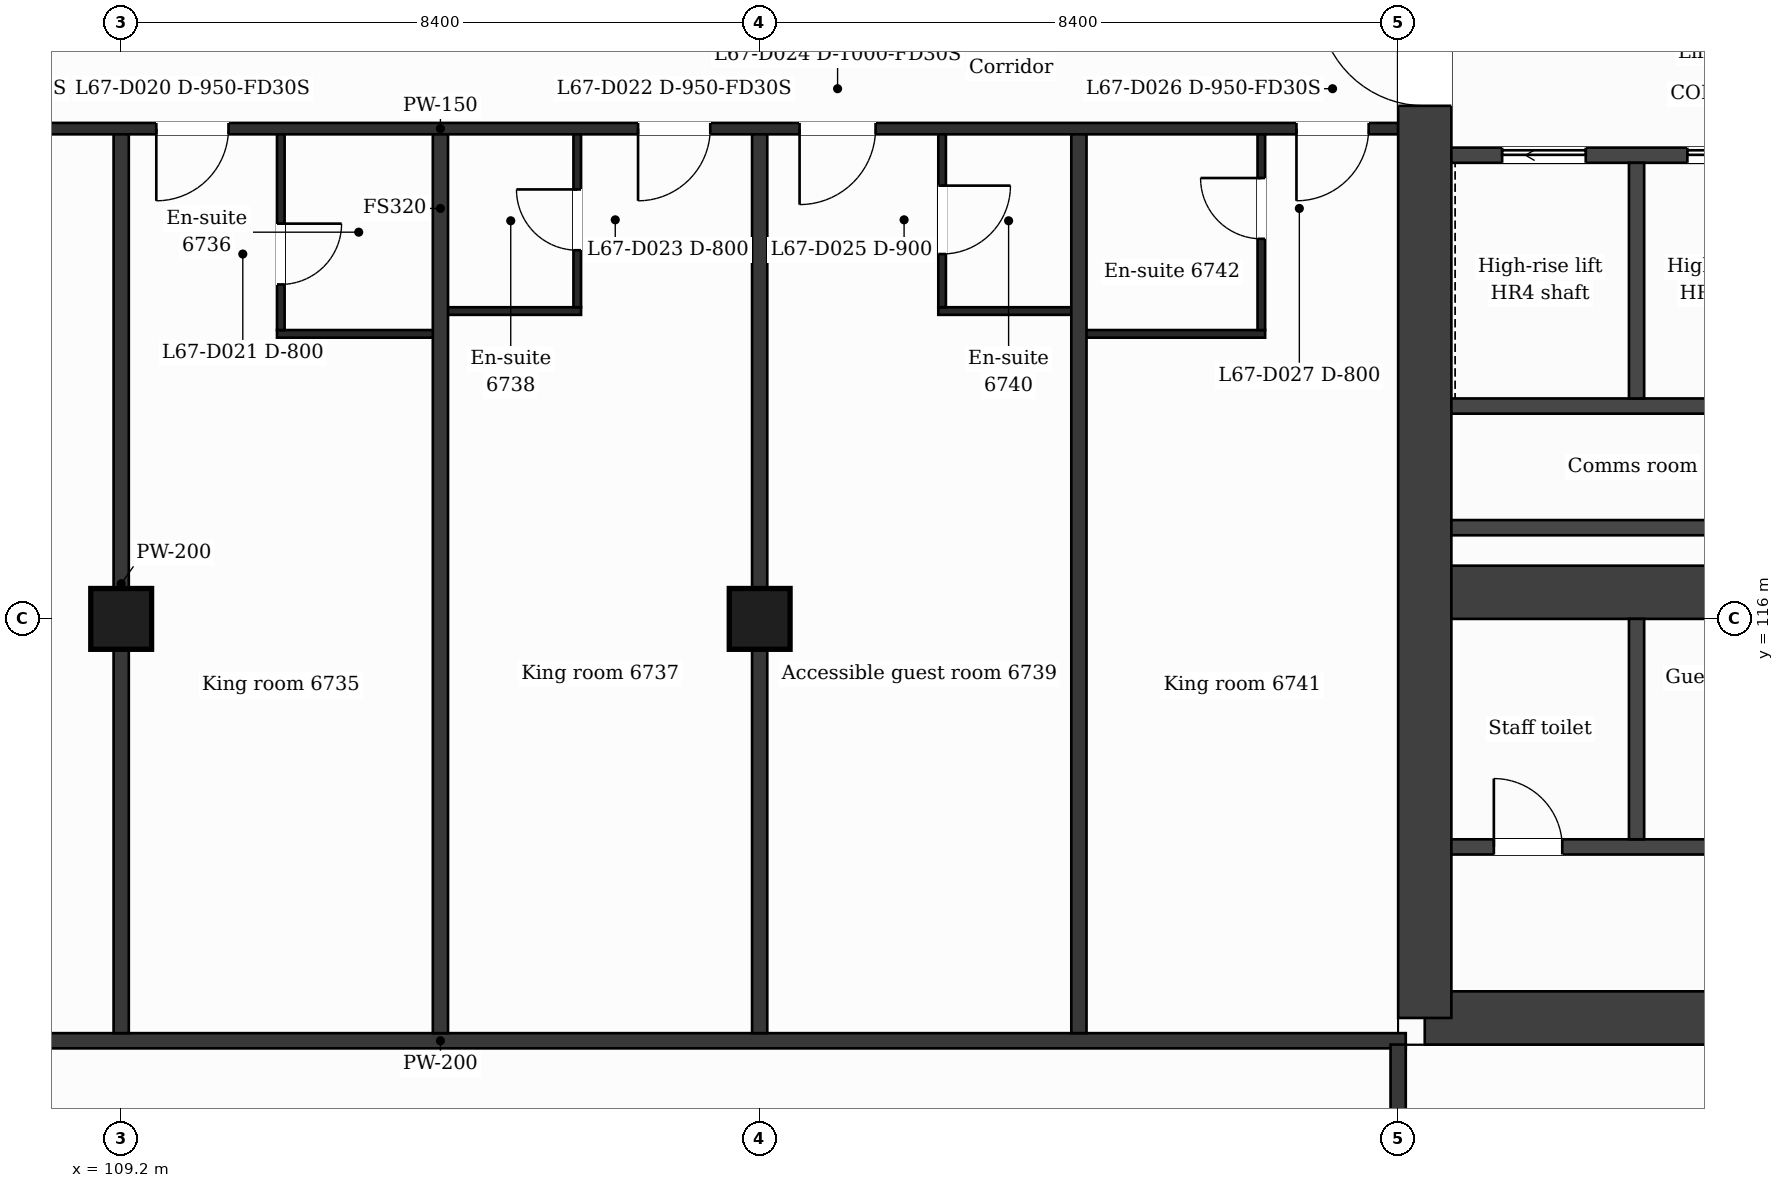
"""IFC4 building model, lengths in metres.
Left out: names, types, materials, properties, quantities, classifications, styles, units other than length and angle.
Written with IfcOpenShell. Run it as: python <this file> out.ifc"""

import sys

from ifc_helpers import new_model, si_unit, direction, frame, frame_2d, origin, origin_2d, place, context, subcontext, project, spatial, rectangle, extrude, element, fill, save


model = new_model("IFC4")
c1 = context("Model", 3, precision=1e-05, world=origin(), true_north=direction((0.0, 1.0)))
c2 = subcontext(c1, "Body", "Model", "MODEL_VIEW")
j1 = project(units=[si_unit("LENGTHUNIT", "METRE"), si_unit("PLANEANGLEUNIT", "RADIAN")], contexts=[c1])
p1 = place(None, origin())
s1 = spatial("IfcSite", under=j1, at=p1, CompositionType="ELEMENT")
p2 = place(p1, origin())
s2 = spatial("IfcBuilding", under=s1, at=p2, CompositionType="ELEMENT")
p3 = place(p2, frame((0.0, 0.0, 277.5)))
s3 = spatial("IfcBuildingStorey", under=s2, at=p3, CompositionType="ELEMENT", Elevation=277.5)
p4 = place(p3, frame((140.73, 110.75, 0.0), z_axis=(0.0, 0.0, 1.0), x_axis=(-1.0, 0.0, 0.0)))
e1 = element("IfcWall", 1, at=p4, inside=s3, PredefinedType="SHEAR", context=c2, shape_type="SweptSolid", body=[
    extrude(rectangle(XDim=14.38, YDim=0.7, at=frame_2d((7.19, 0.0))), origin(), (0.0, 0.0, 1.0), 3.7),
])
p5 = place(p4, frame((7.12, 0.0, 0.0)))
e2 = element("IfcOpeningElement", 2, at=p5, cuts=e1, PredefinedType="OPENING", context=c2, shape_type="SweptSolid", body=[
    extrude(rectangle(XDim=1.2, YDim=2.1, at=frame_2d((0.6, 1.05))), frame((0.0, 0.36, 0.0), z_axis=(0.0, -1.0, 0.0), x_axis=(1.0, 0.0, 0.0)), (0.0, 0.0, 1.0), 0.72),
])
p6 = place(p3, frame((126.35, 110.75, 0.0), z_axis=(0.0, 0.0, 1.0), x_axis=(0.0, 1.0, 0.0)))
e3 = element("IfcWall", 3, at=p6, inside=s3, PredefinedType="SHEAR", context=c2, shape_type="SweptSolid", body=[
    extrude(rectangle(XDim=21.3, YDim=0.7, at=frame_2d((10.65, 0.0))), origin(), (0.0, 0.0, 1.0), 3.7),
])
p7 = place(p6, frame((12.0, 0.0, 0.0)))
e4 = element("IfcOpeningElement", 4, at=p7, cuts=e3, PredefinedType="OPENING", context=c2, shape_type="SweptSolid", body=[
    extrude(rectangle(XDim=1.4, YDim=2.1, at=frame_2d((0.7, 1.05))), frame((0.0, 0.36, 0.0), z_axis=(0.0, -1.0, 0.0), x_axis=(1.0, 0.0, 0.0)), (0.0, 0.0, 1.0), 0.72),
])
p8 = place(p3, frame((126.7, 116.35, 0.0), z_axis=(0.0, 0.0, 1.0), x_axis=(1.0, 0.0, 0.0)))
e5 = element("IfcWall", 5, at=p8, inside=s3, PredefinedType="SHEAR", context=c2, shape_type="SweptSolid", body=[
    extrude(rectangle(XDim=5.5, YDim=0.7, at=frame_2d((2.75, 0.0))), origin(), (0.0, 0.0, 1.0), 3.7),
])
for number, where, z_axis, x_axis in (
    (6, (109.2, 116.0, 0.0), (0.0, 0.0, 1.0), (1.0, 0.0, 0.0)),
    (7, (117.6, 116.0, 0.0), (0.0, 0.0, 1.0), (1.0, 0.0, 0.0)),
):
    element("IfcColumn", number, at=place(p3, frame(where, z_axis=z_axis, x_axis=x_axis)), inside=s3, PredefinedType="COLUMN", context=c2, shape_type="SweptSolid", body=[
        extrude(rectangle(XDim=0.8, YDim=0.8, at=origin_2d()), origin(), (0.0, 0.0, 1.0), 3.7),
    ])
p9 = place(p3, frame((100.7, 110.45, 0.0), z_axis=(0.0, 0.0, 1.0), x_axis=(1.0, 0.0, 0.0)))
e8 = element("IfcWall", 8, at=p9, inside=s3, PredefinedType="PARTITIONING", context=c2, shape_type="SweptSolid", body=[
    extrude(rectangle(XDim=25.4, YDim=0.2, at=frame_2d((12.7, 0.0))), origin(), (0.0, 0.0, 1.0), 3.38),
])
p10 = place(p3, frame((126.7, 113.0, 0.0), z_axis=(0.0, 0.0, 1.0), x_axis=(1.0, 0.0, 0.0)))
e9 = element("IfcWall", 9, at=p10, inside=s3, PredefinedType="PARTITIONING", context=c2, shape_type="SweptSolid", body=[
    extrude(rectangle(XDim=4.973, YDim=0.2, at=frame_2d((2.487, 0.0))), origin(), (0.0, 0.0, 1.0), 3.38),
])
p11 = place(p10, frame((0.559, 0.0, 0.0)))
e10 = element("IfcOpeningElement", 10, at=p11, cuts=e9, PredefinedType="OPENING", context=c2, shape_type="SweptSolid", body=[
    extrude(rectangle(XDim=0.9, YDim=2.1, at=frame_2d((0.45, 1.05))), frame((0.0, 0.11, 0.0), z_axis=(0.0, -1.0, 0.0), x_axis=(1.0, 0.0, 0.0)), (0.0, 0.0, 1.0), 0.22),
])
for number, where, z_axis, x_axis in (
    (11, (126.7, 117.2, 0.0), (0.0, 0.0, 1.0), (1.0, 0.0, 0.0)),
    (12, (126.7, 118.8, 0.0), (0.0, 0.0, 1.0), (1.0, 0.0, 0.0)),
):
    element("IfcWall", number, at=place(p3, frame(where, z_axis=z_axis, x_axis=x_axis)), inside=s3, PredefinedType="PARTITIONING", context=c2, shape_type="SweptSolid", body=[
        extrude(rectangle(XDim=4.873, YDim=0.2, at=frame_2d((2.437, 0.0))), origin(), (0.0, 0.0, 1.0), 3.38),
    ])
p12 = place(p3, frame((111.25, 119.75, 0.0), z_axis=(0.0, 0.0, 1.0), x_axis=(1.0, 0.0, 0.0)))
e13 = element("IfcWall", 13, at=p12, inside=s3, PredefinedType="PARTITIONING", context=c2, shape_type="SweptSolid", body=[
    extrude(rectangle(XDim=2.15, YDim=0.1, at=frame_2d((1.075, 0.0))), origin(), (0.0, 0.0, 1.0), 3.38),
])
p13 = place(p3, frame((121.8, 119.75, 0.0), z_axis=(0.0, 0.0, 1.0), x_axis=(1.0, 0.0, 0.0)))
e14 = element("IfcWall", 14, at=p13, inside=s3, PredefinedType="PARTITIONING", context=c2, shape_type="SweptSolid", body=[
    extrude(rectangle(XDim=2.45, YDim=0.1, at=frame_2d((1.225, 0.0))), origin(), (0.0, 0.0, 1.0), 3.38),
])
for number, where, z_axis, x_axis in (
    (15, (113.4, 120.05, 0.0), (0.0, 0.0, 1.0), (1.0, 0.0, 0.0)),
    (16, (119.95, 120.05, 0.0), (0.0, 0.0, 1.0), (1.0, 0.0, 0.0)),
):
    element("IfcWall", number, at=place(p3, frame(where, z_axis=z_axis, x_axis=x_axis)), inside=s3, PredefinedType="PARTITIONING", context=c2, shape_type="SweptSolid", body=[
        extrude(rectangle(XDim=1.85, YDim=0.1, at=frame_2d((0.925, 0.0))), origin(), (0.0, 0.0, 1.0), 3.38),
    ])
p14 = place(p3, frame((126.7, 122.1, 0.0), z_axis=(0.0, 0.0, 1.0), x_axis=(1.0, 0.0, 0.0)))
e17 = element("IfcWall", 17, at=p14, inside=s3, PredefinedType="PARTITIONING", context=c2, shape_type="SweptSolid", body=[
    extrude(rectangle(XDim=4.873, YDim=0.2, at=frame_2d((2.437, 0.0))), origin(), (0.0, 0.0, 1.0), 3.38),
])
p15 = place(p14, frame((3.105, 0.0, 0.0)))
e18 = element("IfcOpeningElement", 18, at=p15, cuts=e17, PredefinedType="OPENING", context=c2, shape_type="SweptSolid", body=[
    extrude(rectangle(XDim=1.1, YDim=2.1, at=frame_2d((0.55, 1.05))), frame((0.0, 0.11, 0.0), z_axis=(0.0, -1.0, 0.0), x_axis=(1.0, 0.0, 0.0)), (0.0, 0.0, 1.0), 0.22),
])
p16 = place(p14, frame((0.668, 0.0, 0.0)))
e19 = element("IfcOpeningElement", 19, at=p16, cuts=e17, PredefinedType="OPENING", context=c2, shape_type="SweptSolid", body=[
    extrude(rectangle(XDim=1.1, YDim=2.1, at=frame_2d((0.55, 1.05))), frame((0.0, 0.11, 0.0), z_axis=(0.0, -1.0, 0.0), x_axis=(1.0, 0.0, 0.0)), (0.0, 0.0, 1.0), 0.22),
])
p17 = place(p3, frame((100.8, 122.45, 0.0), z_axis=(0.0, 0.0, 1.0), x_axis=(1.0, 0.0, 0.0)))
e20 = element("IfcWall", 20, at=p17, inside=s3, PredefinedType="PARTITIONING", context=c2, shape_type="SweptSolid", body=[
    extrude(rectangle(XDim=25.2, YDim=0.15, at=frame_2d((12.6, 0.0))), origin(), (0.0, 0.0, 1.0), 3.38),
])
p18 = place(p17, frame((5.55, 0.0, 0.0)))
e21 = element("IfcOpeningElement", 21, at=p18, cuts=e20, PredefinedType="OPENING", context=c2, shape_type="SweptSolid", body=[
    extrude(rectangle(XDim=1.0, YDim=2.1, at=frame_2d((0.5, 1.05))), frame((0.0, 0.085, 0.0), z_axis=(0.0, -1.0, 0.0), x_axis=(1.0, 0.0, 0.0)), (0.0, 0.0, 1.0), 0.17),
])
p19 = place(p17, frame((8.862, 0.0, 0.0)))
e22 = element("IfcOpeningElement", 22, at=p19, cuts=e20, PredefinedType="OPENING", context=c2, shape_type="SweptSolid", body=[
    extrude(rectangle(XDim=0.95, YDim=2.1, at=frame_2d((0.475, 1.05))), frame((0.0, 0.085, 0.0), z_axis=(0.0, -1.0, 0.0), x_axis=(1.0, 0.0, 0.0)), (0.0, 0.0, 1.0), 0.17),
])
p20 = place(p17, frame((15.2, 0.0, 0.0)))
e23 = element("IfcOpeningElement", 23, at=p20, cuts=e20, PredefinedType="OPENING", context=c2, shape_type="SweptSolid", body=[
    extrude(rectangle(XDim=0.95, YDim=2.1, at=frame_2d((0.475, 1.05))), frame((0.0, 0.085, 0.0), z_axis=(0.0, -1.0, 0.0), x_axis=(1.0, 0.0, 0.0)), (0.0, 0.0, 1.0), 0.17),
])
p21 = place(p17, frame((17.325, 0.0, 0.0)))
e24 = element("IfcOpeningElement", 24, at=p21, cuts=e20, PredefinedType="OPENING", context=c2, shape_type="SweptSolid", body=[
    extrude(rectangle(XDim=1.0, YDim=2.1, at=frame_2d((0.5, 1.05))), frame((0.0, 0.085, 0.0), z_axis=(0.0, -1.0, 0.0), x_axis=(1.0, 0.0, 0.0)), (0.0, 0.0, 1.0), 0.17),
])
p22 = place(p17, frame((23.862, 0.0, 0.0)))
e25 = element("IfcOpeningElement", 25, at=p22, cuts=e20, PredefinedType="OPENING", context=c2, shape_type="SweptSolid", body=[
    extrude(rectangle(XDim=0.95, YDim=2.1, at=frame_2d((0.475, 1.05))), frame((0.0, 0.085, 0.0), z_axis=(0.0, -1.0, 0.0), x_axis=(1.0, 0.0, 0.0)), (0.0, 0.0, 1.0), 0.17),
])
p23 = place(p3, frame((109.2, 110.55, 0.0), z_axis=(0.0, 0.0, 1.0), x_axis=(0.0, 1.0, 0.0)))
e26 = element("IfcWall", 26, at=p23, inside=s3, PredefinedType="PARTITIONING", context=c2, shape_type="SweptSolid", body=[
    extrude(rectangle(XDim=11.825, YDim=0.2, at=frame_2d((5.913, 0.0))), origin(), (0.0, 0.0, 1.0), 3.38),
])
p24 = place(p3, frame((111.3, 119.8, 0.0), z_axis=(0.0, 0.0, 1.0), x_axis=(0.0, 1.0, 0.0)))
e27 = element("IfcWall", 27, at=p24, inside=s3, PredefinedType="PARTITIONING", context=c2, shape_type="SweptSolid", body=[
    extrude(rectangle(XDim=2.575, YDim=0.1, at=frame_2d((1.288, 0.0))), origin(), (0.0, 0.0, 1.0), 3.38),
])
p25 = place(p24, frame((0.6, 0.0, 0.0)))
e28 = element("IfcOpeningElement", 28, at=p25, cuts=e27, PredefinedType="OPENING", context=c2, shape_type="SweptSolid", body=[
    extrude(rectangle(XDim=0.8, YDim=2.1, at=frame_2d((0.4, 1.05))), frame((0.0, 0.06, 0.0), z_axis=(0.0, -1.0, 0.0), x_axis=(1.0, 0.0, 0.0)), (0.0, 0.0, 1.0), 0.12),
])
p26 = place(p3, frame((113.4, 110.55, 0.0), z_axis=(0.0, 0.0, 1.0), x_axis=(0.0, 1.0, 0.0)))
e29 = element("IfcWall", 29, at=p26, inside=s3, PredefinedType="PARTITIONING", context=c2, shape_type="SweptSolid", body=[
    extrude(rectangle(XDim=11.825, YDim=0.2, at=frame_2d((5.913, 0.0))), origin(), (0.0, 0.0, 1.0), 3.38),
])
p27 = place(p3, frame((115.2, 120.1, 0.0), z_axis=(0.0, 0.0, 1.0), x_axis=(0.0, 1.0, 0.0)))
e30 = element("IfcWall", 30, at=p27, inside=s3, PredefinedType="PARTITIONING", context=c2, shape_type="SweptSolid", body=[
    extrude(rectangle(XDim=2.275, YDim=0.1, at=frame_2d((1.137, 0.0))), origin(), (0.0, 0.0, 1.0), 3.38),
])
p28 = place(p27, frame((0.75, 0.0, 0.0)))
e31 = element("IfcOpeningElement", 31, at=p28, cuts=e30, PredefinedType="OPENING", context=c2, shape_type="SweptSolid", body=[
    extrude(rectangle(XDim=0.8, YDim=2.1, at=frame_2d((0.4, 1.05))), frame((0.0, 0.06, 0.0), z_axis=(0.0, -1.0, 0.0), x_axis=(1.0, 0.0, 0.0)), (0.0, 0.0, 1.0), 0.12),
])
p29 = place(p3, frame((117.6, 110.55, 0.0), z_axis=(0.0, 0.0, 1.0), x_axis=(0.0, 1.0, 0.0)))
e32 = element("IfcWall", 32, at=p29, inside=s3, PredefinedType="PARTITIONING", context=c2, shape_type="SweptSolid", body=[
    extrude(rectangle(XDim=11.825, YDim=0.2, at=frame_2d((5.913, 0.0))), origin(), (0.0, 0.0, 1.0), 3.38),
])
p30 = place(p3, frame((120.0, 120.1, 0.0), z_axis=(0.0, 0.0, 1.0), x_axis=(0.0, 1.0, 0.0)))
e33 = element("IfcWall", 33, at=p30, inside=s3, PredefinedType="PARTITIONING", context=c2, shape_type="SweptSolid", body=[
    extrude(rectangle(XDim=2.275, YDim=0.1, at=frame_2d((1.137, 0.0))), origin(), (0.0, 0.0, 1.0), 3.38),
])
p31 = place(p30, frame((0.7, 0.0, 0.0)))
e34 = element("IfcOpeningElement", 34, at=p31, cuts=e33, PredefinedType="OPENING", context=c2, shape_type="SweptSolid", body=[
    extrude(rectangle(XDim=0.9, YDim=2.1, at=frame_2d((0.45, 1.05))), frame((0.0, 0.06, 0.0), z_axis=(0.0, -1.0, 0.0), x_axis=(1.0, 0.0, 0.0)), (0.0, 0.0, 1.0), 0.12),
])
p32 = place(p3, frame((121.8, 110.55, 0.0), z_axis=(0.0, 0.0, 1.0), x_axis=(0.0, 1.0, 0.0)))
e35 = element("IfcWall", 35, at=p32, inside=s3, PredefinedType="PARTITIONING", context=c2, shape_type="SweptSolid", body=[
    extrude(rectangle(XDim=11.825, YDim=0.2, at=frame_2d((5.913, 0.0))), origin(), (0.0, 0.0, 1.0), 3.38),
])
p33 = place(p3, frame((124.2, 119.8, 0.0), z_axis=(0.0, 0.0, 1.0), x_axis=(0.0, 1.0, 0.0)))
e36 = element("IfcWall", 36, at=p33, inside=s3, PredefinedType="PARTITIONING", context=c2, shape_type="SweptSolid", body=[
    extrude(rectangle(XDim=2.575, YDim=0.1, at=frame_2d((1.288, 0.0))), origin(), (0.0, 0.0, 1.0), 3.38),
])
p34 = place(p33, frame((1.2, 0.0, 0.0)))
e37 = element("IfcOpeningElement", 37, at=p34, cuts=e36, PredefinedType="OPENING", context=c2, shape_type="SweptSolid", body=[
    extrude(rectangle(XDim=0.8, YDim=2.1, at=frame_2d((0.4, 1.05))), frame((0.0, 0.06, 0.0), z_axis=(0.0, -1.0, 0.0), x_axis=(1.0, 0.0, 0.0)), (0.0, 0.0, 1.0), 0.12),
])
p35 = place(p3, frame((126.0, 108.79, 0.0), z_axis=(0.0, 0.0, 1.0), x_axis=(0.0, 1.0, 0.0)))
e38 = element("IfcWall", 38, at=p35, inside=s3, PredefinedType="PARTITIONING", context=c2, shape_type="SweptSolid", body=[
    extrude(rectangle(XDim=1.61, YDim=0.2, at=frame_2d((0.805, 0.0))), origin(), (0.0, 0.0, 1.0), 3.38),
])
p36 = place(p3, frame((129.136, 113.1, 0.0), z_axis=(0.0, 0.0, 1.0), x_axis=(0.0, 1.0, 0.0)))
e39 = element("IfcWall", 39, at=p36, inside=s3, PredefinedType="PARTITIONING", context=c2, shape_type="SweptSolid", body=[
    extrude(rectangle(XDim=2.9, YDim=0.2, at=frame_2d((1.45, 0.0))), origin(), (0.0, 0.0, 1.0), 3.38),
])
p37 = place(p3, frame((129.136, 118.9, 0.0), z_axis=(0.0, 0.0, 1.0), x_axis=(0.0, 1.0, 0.0)))
e40 = element("IfcWall", 40, at=p37, inside=s3, PredefinedType="PARTITIONING", context=c2, shape_type="SweptSolid", body=[
    extrude(rectangle(XDim=3.1, YDim=0.2, at=frame_2d((1.55, 0.0))), origin(), (0.0, 0.0, 1.0), 3.38),
])
p38 = place(p15, origin())
e41 = element("IfcDoor", 41, at=p38, inside=s3, OperationType="SLIDING_TO_LEFT", PredefinedType="DOOR", context=c2, shape_type="SweptSolid", body=[
    extrude(rectangle(XDim=1.1, YDim=2.1, at=frame_2d((0.55, 1.05))), frame((0.0, 0.025, 0.0), z_axis=(0.0, -1.0, 0.0), x_axis=(1.0, 0.0, 0.0)), (0.0, 0.0, 1.0), 0.05),
])
fill(e18, e41)
p39 = place(p16, origin())
e42 = element("IfcDoor", 42, at=p39, inside=s3, OperationType="SLIDING_TO_LEFT", PredefinedType="DOOR", context=c2, shape_type="SweptSolid", body=[
    extrude(rectangle(XDim=1.1, YDim=2.1, at=frame_2d((0.55, 1.05))), frame((0.0, 0.025, 0.0), z_axis=(0.0, -1.0, 0.0), x_axis=(1.0, 0.0, 0.0)), (0.0, 0.0, 1.0), 0.05),
])
fill(e19, e42)
p40 = place(p11, origin())
e43 = element("IfcDoor", 43, at=p40, inside=s3, OperationType="SINGLE_SWING_LEFT", PredefinedType="DOOR", context=c2, shape_type="SweptSolid", body=[
    extrude(rectangle(XDim=0.9, YDim=2.1, at=frame_2d((0.45, 1.05))), frame((0.0, 0.025, 0.0), z_axis=(0.0, -1.0, 0.0), x_axis=(1.0, 0.0, 0.0)), (0.0, 0.0, 1.0), 0.05),
])
fill(e10, e43)
p41 = place(p19, origin())
e44 = element("IfcDoor", 44, at=p41, inside=s3, OperationType="SINGLE_SWING_LEFT", PredefinedType="DOOR", context=c2, shape_type="SweptSolid", body=[
    extrude(rectangle(XDim=0.95, YDim=2.1, at=frame_2d((0.475, 1.05))), frame((0.0, 0.025, 0.0), z_axis=(0.0, -1.0, 0.0), x_axis=(1.0, 0.0, 0.0)), (0.0, 0.0, 1.0), 0.05),
])
fill(e22, e44)
p42 = place(p25, origin())
e45 = element("IfcDoor", 45, at=p42, inside=s3, OperationType="SINGLE_SWING_RIGHT", PredefinedType="DOOR", context=c2, shape_type="SweptSolid", body=[
    extrude(rectangle(XDim=0.8, YDim=2.1, at=frame_2d((0.4, 1.05))), frame((0.0, 0.025, 0.0), z_axis=(0.0, -1.0, 0.0), x_axis=(1.0, 0.0, 0.0)), (0.0, 0.0, 1.0), 0.05),
])
fill(e28, e45)
p43 = place(p20, origin())
e46 = element("IfcDoor", 46, at=p43, inside=s3, OperationType="SINGLE_SWING_LEFT", PredefinedType="DOOR", context=c2, shape_type="SweptSolid", body=[
    extrude(rectangle(XDim=0.95, YDim=2.1, at=frame_2d((0.475, 1.05))), frame((0.0, 0.025, 0.0), z_axis=(0.0, -1.0, 0.0), x_axis=(1.0, 0.0, 0.0)), (0.0, 0.0, 1.0), 0.05),
])
fill(e23, e46)
p44 = place(p28, origin())
e47 = element("IfcDoor", 47, at=p44, inside=s3, OperationType="SINGLE_SWING_RIGHT", PredefinedType="DOOR", context=c2, shape_type="SweptSolid", body=[
    extrude(rectangle(XDim=0.8, YDim=2.1, at=frame_2d((0.4, 1.05))), frame((0.0, 0.025, 0.0), z_axis=(0.0, -1.0, 0.0), x_axis=(1.0, 0.0, 0.0)), (0.0, 0.0, 1.0), 0.05),
])
fill(e31, e47)
p45 = place(p21, origin())
e48 = element("IfcDoor", 48, at=p45, inside=s3, OperationType="SINGLE_SWING_LEFT", PredefinedType="DOOR", context=c2, shape_type="SweptSolid", body=[
    extrude(rectangle(XDim=1.0, YDim=2.1, at=frame_2d((0.5, 1.05))), frame((0.0, 0.025, 0.0), z_axis=(0.0, -1.0, 0.0), x_axis=(1.0, 0.0, 0.0)), (0.0, 0.0, 1.0), 0.05),
])
fill(e24, e48)
p46 = place(p31, origin())
e49 = element("IfcDoor", 49, at=p46, inside=s3, OperationType="SINGLE_SWING_RIGHT", PredefinedType="DOOR", context=c2, shape_type="SweptSolid", body=[
    extrude(rectangle(XDim=0.9, YDim=2.1, at=frame_2d((0.45, 1.05))), frame((0.0, 0.025, 0.0), z_axis=(0.0, -1.0, 0.0), x_axis=(1.0, 0.0, 0.0)), (0.0, 0.0, 1.0), 0.05),
])
fill(e34, e49)
p47 = place(p22, origin())
e50 = element("IfcDoor", 50, at=p47, inside=s3, OperationType="SINGLE_SWING_LEFT", PredefinedType="DOOR", context=c2, shape_type="SweptSolid", body=[
    extrude(rectangle(XDim=0.95, YDim=2.1, at=frame_2d((0.475, 1.05))), frame((0.0, 0.025, 0.0), z_axis=(0.0, -1.0, 0.0), x_axis=(1.0, 0.0, 0.0)), (0.0, 0.0, 1.0), 0.05),
])
fill(e25, e50)
p48 = place(p34, origin())
e51 = element("IfcDoor", 51, at=p48, inside=s3, OperationType="SINGLE_SWING_RIGHT", PredefinedType="DOOR", context=c2, shape_type="SweptSolid", body=[
    extrude(rectangle(XDim=0.8, YDim=2.1, at=frame_2d((0.4, 1.05))), frame((0.0, 0.025, 0.0), z_axis=(0.0, -1.0, 0.0), x_axis=(1.0, 0.0, 0.0)), (0.0, 0.0, 1.0), 0.05),
])
fill(e37, e51)
p49 = place(p7, origin())
e52 = element("IfcDoor", 52, at=p49, inside=s3, OperationType="SINGLE_SWING_RIGHT", PredefinedType="DOOR", context=c2, shape_type="SweptSolid", body=[
    extrude(rectangle(XDim=1.4, YDim=2.1, at=frame_2d((0.7, 1.05))), frame((0.0, 0.025, 0.0), z_axis=(0.0, -1.0, 0.0), x_axis=(1.0, 0.0, 0.0)), (0.0, 0.0, 1.0), 0.05),
])
fill(e4, e52)
save(model, sys.argv[1])
